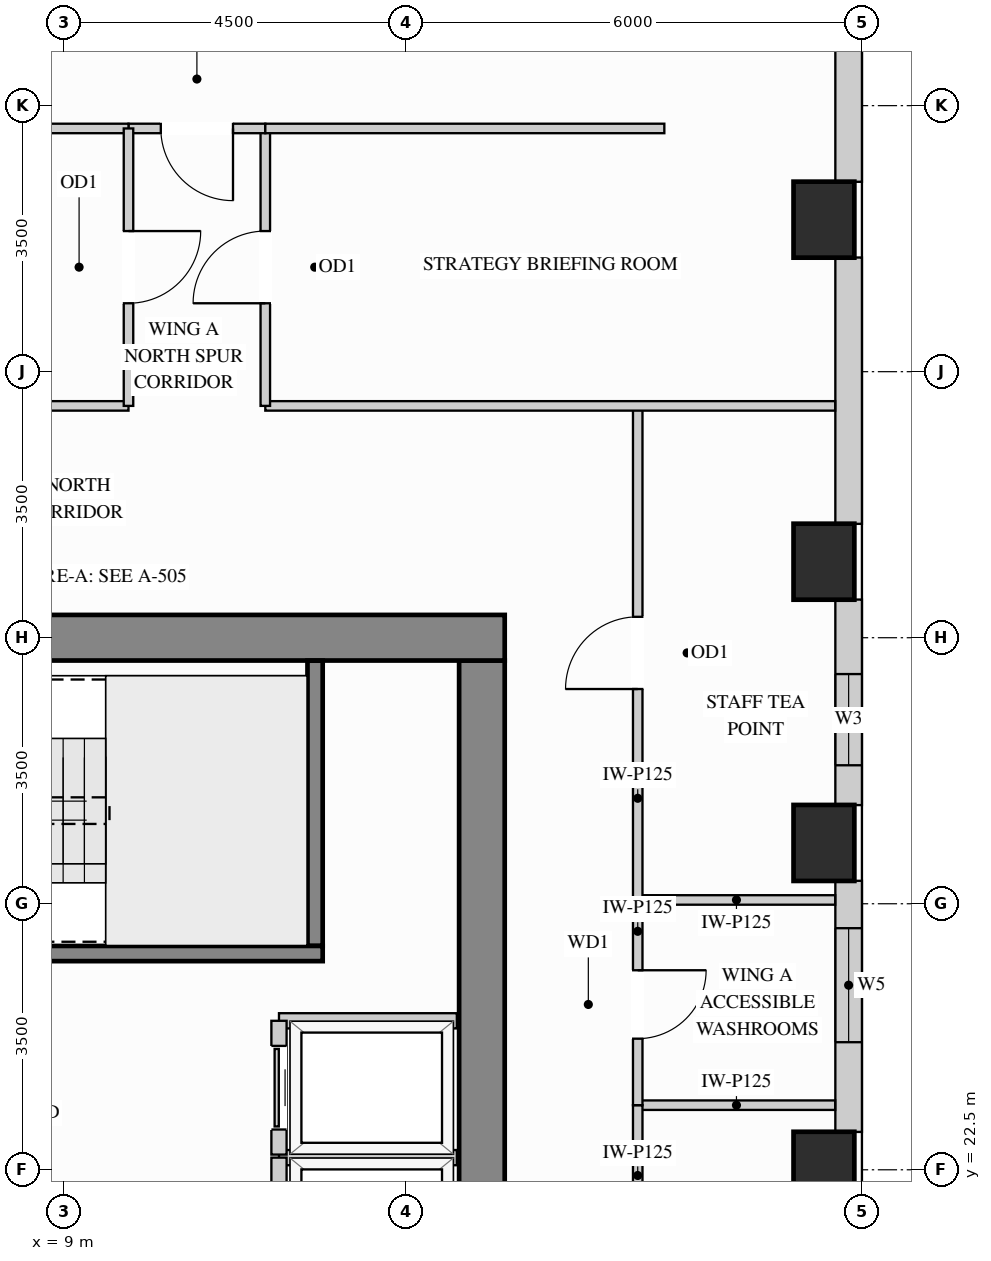
"""IFC4 building model, lengths in metres.
Left out: names, types, materials, properties, quantities, classifications, styles, units other than length and angle.
Written with IfcOpenShell. Run it as: python <this file> out.ifc"""

import sys

from ifc_helpers import new_model, si_unit, direction, frame, frame_2d, origin, origin_2d, place, context, subcontext, project, spatial, rectangle, extrude, source, transform, mapped, element, fill, save


model = new_model("IFC4")
c1 = context("Model", 3, precision=1e-05, world=origin(), true_north=direction((0.0, 1.0)))
c2 = subcontext(c1, "Body", "Model", "MODEL_VIEW")
j1 = project(units=[si_unit("LENGTHUNIT", "METRE"), si_unit("PLANEANGLEUNIT", "RADIAN")], contexts=[c1])
p1 = place(None, origin())
s1 = spatial("IfcSite", under=j1, at=p1, CompositionType="ELEMENT")
p2 = place(p1, origin())
s2 = spatial("IfcBuilding", under=s1, at=p2, CompositionType="ELEMENT")
p3 = place(p2, frame((0.0, 0.0, 179.1)))
s3 = spatial("IfcBuildingStorey", under=s2, at=p3, CompositionType="ELEMENT", Elevation=179.1)
m1 = source(origin(), c2, "Body", "SweptSolid", [
    extrude(rectangle(XDim=0.8, YDim=1.0, at=origin_2d()), origin(), (0.0, 0.0, 1.0), 3.4),
])
for number, where, z_axis, x_axis in (
    (1, (19.0, 22.5, 0.0), (0.0, 0.0, 1.0), (1.0, 0.0, 0.0)),
    (2, (19.0, 26.8, 0.0), (0.0, 0.0, 1.0), (1.0, 0.0, 0.0)),
    (3, (19.0, 30.5, 0.0), (0.0, 0.0, 1.0), (1.0, 0.0, 0.0)),
    (4, (19.0, 35.0, 0.0), (0.0, 0.0, 1.0), (1.0, 0.0, 0.0)),
):
    element("IfcColumn", number, at=place(p3, frame(where, z_axis=z_axis, x_axis=x_axis)), inside=s3, PredefinedType="COLUMN", context=c2, shape_type="MappedRepresentation", body=[
        mapped(m1, transform((0.0, 0.0, 0.0), x_axis=(1.0, 0.0, 0.0), y_axis=(0.0, 1.0, 0.0), z_axis=(0.0, 0.0, 1.0))),
    ])
m2 = source(origin(), c2, "Body", "SweptSolid", [
    extrude(rectangle(XDim=8.32, YDim=0.6, at=frame_2d((4.16, 0.0))), origin(), (0.0, 0.0, 1.0), 3.4),
])
p4 = place(p3, frame((14.5, 20.88, 0.0), z_axis=(0.0, 0.0, 1.0), x_axis=(0.0, 1.0, 0.0)))
e5 = element("IfcWall", 5, at=p4, inside=s3, PredefinedType="SHEAR", context=c2, shape_type="MappedRepresentation", body=[
    mapped(m2, transform((0.0, 0.0, 0.0), x_axis=(1.0, 0.0, 0.0), y_axis=(0.0, 1.0, 0.0), z_axis=(0.0, 0.0, 1.0))),
])
m3 = source(origin(), c2, "Body", "SweptSolid", [
    extrude(rectangle(XDim=10.6, YDim=0.6, at=frame_2d((5.3, 0.0))), origin(), (0.0, 0.0, 1.0), 3.4),
])
p5 = place(p3, frame((4.2, 29.5, 0.0), z_axis=(0.0, 0.0, 1.0), x_axis=(1.0, 0.0, 0.0)))
e6 = element("IfcWall", 6, at=p5, inside=s3, PredefinedType="SHEAR", context=c2, shape_type="MappedRepresentation", body=[
    mapped(m3, transform((0.0, 0.0, 0.0), x_axis=(1.0, 0.0, 0.0), y_axis=(0.0, 1.0, 0.0), z_axis=(0.0, 0.0, 1.0))),
])
p6 = place(p3, frame((19.325, 22.998, 0.0), z_axis=(0.0, 0.0, 1.0), x_axis=(0.0, 1.0, 0.0)))
e7 = element("IfcWall", 7, at=p6, inside=s3, PredefinedType="SOLIDWALL", context=c2, shape_type="SweptSolid", body=[
    extrude(rectangle(XDim=3.304, YDim=0.35, at=frame_2d((1.652, 0.0))), origin(), (0.0, 0.0, 1.0), 2.612),
])
p7 = place(p6, frame((1.18, 0.0, 0.78)))
e8 = element("IfcOpeningElement", 8, at=p7, cuts=e7, PredefinedType="OPENING", context=c2, shape_type="SweptSolid", body=[
    extrude(rectangle(XDim=1.5, YDim=1.652, at=frame_2d((0.75, 0.826))), frame((0.0, 0.185, 0.0), z_axis=(0.0, -1.0, 0.0), x_axis=(1.0, 0.0, 0.0)), (0.0, 0.0, 1.0), 0.37),
])
p8 = place(p3, frame((19.325, 27.298, 0.0), z_axis=(0.0, 0.0, 1.0), x_axis=(0.0, 1.0, 0.0)))
e9 = element("IfcWall", 9, at=p8, inside=s3, PredefinedType="SOLIDWALL", context=c2, shape_type="SweptSolid", body=[
    extrude(rectangle(XDim=2.704, YDim=0.35, at=frame_2d((1.352, 0.0))), origin(), (0.0, 0.0, 1.0), 2.612),
])
p9 = place(p8, frame((0.524, 0.0, 0.78)))
e10 = element("IfcOpeningElement", 10, at=p9, cuts=e9, PredefinedType="OPENING", context=c2, shape_type="SweptSolid", body=[
    extrude(rectangle(XDim=1.2, YDim=1.652, at=frame_2d((0.6, 0.826))), frame((0.0, 0.185, 0.0), z_axis=(0.0, -1.0, 0.0), x_axis=(1.0, 0.0, 0.0)), (0.0, 0.0, 1.0), 0.37),
])
m4 = source(origin(), c2, "Body", "SweptSolid", [
    extrude(rectangle(XDim=3.504, YDim=0.35, at=frame_2d((1.752, 0.0))), origin(), (0.0, 0.0, 1.0), 2.612),
])
p10 = place(p3, frame((19.325, 30.998, 0.0), z_axis=(0.0, 0.0, 1.0), x_axis=(0.0, 1.0, 0.0)))
e11 = element("IfcWall", 11, at=p10, inside=s3, PredefinedType="SOLIDWALL", context=c2, shape_type="MappedRepresentation", body=[
    mapped(m4, transform((0.0, 0.0, 0.0), x_axis=(1.0, 0.0, 0.0), y_axis=(0.0, 1.0, 0.0), z_axis=(0.0, 0.0, 1.0))),
])
m5 = source(origin(), c2, "Body", "SweptSolid", [
    extrude(rectangle(XDim=1.904, YDim=0.35, at=frame_2d((0.952, 0.0))), origin(), (0.0, 0.0, 1.0), 2.612),
])
p11 = place(p3, frame((19.325, 35.498, 0.0), z_axis=(0.0, 0.0, 1.0), x_axis=(0.0, 1.0, 0.0)))
e12 = element("IfcWall", 12, at=p11, inside=s3, PredefinedType="SOLIDWALL", context=c2, shape_type="MappedRepresentation", body=[
    mapped(m5, transform((0.0, 0.0, 0.0), x_axis=(1.0, 0.0, 0.0), y_axis=(0.0, 1.0, 0.0), z_axis=(0.0, 0.0, 1.0))),
])
m6 = source(origin(), c2, "Body", "SweptSolid", [
    extrude(rectangle(XDim=2.598, YDim=0.125, at=frame_2d((1.299, 0.0))), origin(), (0.0, 0.0, 1.0), 3.385),
])
for number, where, z_axis, x_axis in (
    (13, (16.55, 23.35, 0.0), (0.0, 0.0, 1.0), (1.0, 0.0, 0.0)),
    (14, (16.55, 26.05, 0.0), (0.0, 0.0, 1.0), (1.0, 0.0, 0.0)),
):
    element("IfcWall", number, at=place(p3, frame(where, z_axis=z_axis, x_axis=x_axis)), inside=s3, PredefinedType="PARTITIONING", context=c2, shape_type="MappedRepresentation", body=[
        mapped(m6, transform((0.0, 0.0, 0.0), x_axis=(1.0, 0.0, 0.0), y_axis=(0.0, 1.0, 0.0), z_axis=(0.0, 0.0, 1.0))),
    ])
p12 = place(p3, frame((16.55, 18.5, 0.0), z_axis=(0.0, 0.0, 1.0), x_axis=(0.0, 1.0, 0.0)))
e15 = element("IfcWall", 15, at=p12, inside=s3, PredefinedType="PARTITIONING", context=c2, shape_type="SweptSolid", body=[
    extrude(rectangle(XDim=4.85, YDim=0.125, at=frame_2d((2.425, 0.0))), origin(), (0.0, 0.0, 1.0), 3.385),
])
p13 = place(p12, frame((1.95, 0.0, 0.0)))
e16 = element("IfcOpeningElement", 16, at=p13, cuts=e15, PredefinedType="OPENING", context=c2, shape_type="SweptSolid", body=[
    extrude(rectangle(XDim=0.95, YDim=2.15, at=frame_2d((0.475, 1.075))), frame((0.0, 0.073, 0.0), z_axis=(0.0, -1.0, 0.0), x_axis=(1.0, 0.0, 0.0)), (0.0, 0.0, 1.0), 0.145),
])
p14 = place(p3, frame((16.55, 26.05, 0.0), z_axis=(0.0, 0.0, 1.0), x_axis=(0.0, 1.0, 0.0)))
e17 = element("IfcWall", 17, at=p14, inside=s3, PredefinedType="PARTITIONING", context=c2, shape_type="SweptSolid", body=[
    extrude(rectangle(XDim=6.5, YDim=0.125, at=frame_2d((3.25, 0.0))), origin(), (0.0, 0.0, 1.0), 3.385),
])
p15 = place(p14, frame((2.775, 0.0, 0.0)))
e18 = element("IfcOpeningElement", 18, at=p15, cuts=e17, PredefinedType="OPENING", context=c2, shape_type="SweptSolid", body=[
    extrude(rectangle(XDim=0.95, YDim=2.15, at=frame_2d((0.475, 1.075))), frame((0.0, 0.073, 0.0), z_axis=(0.0, -1.0, 0.0), x_axis=(1.0, 0.0, 0.0)), (0.0, 0.0, 1.0), 0.145),
])
p16 = place(p3, frame((16.55, 23.35, 0.0), z_axis=(0.0, 0.0, 1.0), x_axis=(0.0, 1.0, 0.0)))
e19 = element("IfcWall", 19, at=p16, inside=s3, PredefinedType="PARTITIONING", context=c2, shape_type="SweptSolid", body=[
    extrude(rectangle(XDim=2.7, YDim=0.125, at=frame_2d((1.35, 0.0))), origin(), (0.0, 0.0, 1.0), 3.385),
])
p17 = place(p16, frame((0.875, 0.0, 0.0)))
e20 = element("IfcOpeningElement", 20, at=p17, cuts=e19, PredefinedType="OPENING", context=c2, shape_type="SweptSolid", body=[
    extrude(rectangle(XDim=0.9, YDim=2.15, at=frame_2d((0.45, 1.075))), frame((0.0, 0.073, 0.0), z_axis=(0.0, -1.0, 0.0), x_axis=(1.0, 0.0, 0.0)), (0.0, 0.0, 1.0), 0.145),
])
m7 = source(origin(), c2, "Body", "SweptSolid", [
    extrude(rectangle(XDim=7.498, YDim=0.125, at=frame_2d((3.749, 0.0))), origin(), (0.0, 0.0, 1.0), 3.385),
])
p18 = place(p3, frame((11.65, 32.55, 0.0), z_axis=(0.0, 0.0, 1.0), x_axis=(1.0, 0.0, 0.0)))
e21 = element("IfcWall", 21, at=p18, inside=s3, PredefinedType="PARTITIONING", context=c2, shape_type="MappedRepresentation", body=[
    mapped(m7, transform((0.0, 0.0, 0.0), x_axis=(1.0, 0.0, 0.0), y_axis=(0.0, 1.0, 0.0), z_axis=(0.0, 0.0, 1.0))),
])
m8 = source(origin(), c2, "Body", "SweptSolid", [
    extrude(rectangle(XDim=9.498, YDim=0.125, at=frame_2d((4.749, 0.0))), origin(), (0.0, 0.0, 1.0), 3.385),
])
p19 = place(p3, frame((0.352, 32.55, 0.0), z_axis=(0.0, 0.0, 1.0), x_axis=(1.0, 0.0, 0.0)))
e22 = element("IfcWall", 22, at=p19, inside=s3, PredefinedType="PARTITIONING", context=c2, shape_type="MappedRepresentation", body=[
    mapped(m8, transform((0.0, 0.0, 0.0), x_axis=(1.0, 0.0, 0.0), y_axis=(0.0, 1.0, 0.0), z_axis=(0.0, 0.0, 1.0))),
])
p20 = place(p3, frame((11.65, 32.55, 0.0), z_axis=(0.0, 0.0, 1.0), x_axis=(0.0, 1.0, 0.0)))
e23 = element("IfcWall", 23, at=p20, inside=s3, PredefinedType="PARTITIONING", context=c2, shape_type="SweptSolid", body=[
    extrude(rectangle(XDim=3.65, YDim=0.125, at=frame_2d((1.825, 0.0))), origin(), (0.0, 0.0, 1.0), 3.385),
])
p21 = place(p20, frame((1.35, 0.0, 0.0)))
e24 = element("IfcOpeningElement", 24, at=p21, cuts=e23, PredefinedType="OPENING", context=c2, shape_type="SweptSolid", body=[
    extrude(rectangle(XDim=0.95, YDim=2.15, at=frame_2d((0.475, 1.075))), frame((0.0, 0.073, 0.0), z_axis=(0.0, -1.0, 0.0), x_axis=(1.0, 0.0, 0.0)), (0.0, 0.0, 1.0), 0.145),
])
p22 = place(p3, frame((9.85, 36.2, 0.0), z_axis=(0.0, 0.0, 1.0), x_axis=(1.0, 0.0, 0.0)))
e25 = element("IfcWall", 25, at=p22, inside=s3, PredefinedType="PARTITIONING", context=c2, shape_type="SweptSolid", body=[
    extrude(rectangle(XDim=1.8, YDim=0.125, at=frame_2d((0.9, 0.0))), origin(), (0.0, 0.0, 1.0), 2.848),
])
p23 = place(p22, frame((0.425, 0.0, 0.0)))
e26 = element("IfcOpeningElement", 26, at=p23, cuts=e25, PredefinedType="OPENING", context=c2, shape_type="SweptSolid", body=[
    extrude(rectangle(XDim=0.95, YDim=2.15, at=frame_2d((0.475, 1.075))), frame((0.0, 0.073, 0.0), z_axis=(0.0, -1.0, 0.0), x_axis=(1.0, 0.0, 0.0)), (0.0, 0.0, 1.0), 0.145),
])
m9 = source(origin(), c2, "Body", "SweptSolid", [
    extrude(rectangle(XDim=5.25, YDim=0.125, at=frame_2d((2.625, 0.0))), origin(), (0.0, 0.0, 1.0), 2.848),
])
p24 = place(p3, frame((11.65, 36.2, 0.0), z_axis=(0.0, 0.0, 1.0), x_axis=(1.0, 0.0, 0.0)))
e27 = element("IfcWall", 27, at=p24, inside=s3, PredefinedType="PARTITIONING", context=c2, shape_type="MappedRepresentation", body=[
    mapped(m9, transform((0.0, 0.0, 0.0), x_axis=(1.0, 0.0, 0.0), y_axis=(0.0, 1.0, 0.0), z_axis=(0.0, 0.0, 1.0))),
])
m10 = source(origin(), c2, "Body", "SweptSolid", [
    extrude(rectangle(XDim=7.25, YDim=0.125, at=frame_2d((3.625, 0.0))), origin(), (0.0, 0.0, 1.0), 2.848),
])
p25 = place(p3, frame((2.6, 36.2, 0.0), z_axis=(0.0, 0.0, 1.0), x_axis=(1.0, 0.0, 0.0)))
e28 = element("IfcWall", 28, at=p25, inside=s3, PredefinedType="PARTITIONING", context=c2, shape_type="MappedRepresentation", body=[
    mapped(m10, transform((0.0, 0.0, 0.0), x_axis=(1.0, 0.0, 0.0), y_axis=(0.0, 1.0, 0.0), z_axis=(0.0, 0.0, 1.0))),
])
p26 = place(p3, frame((9.85, 32.55, 0.0), z_axis=(0.0, 0.0, 1.0), x_axis=(0.0, 1.0, 0.0)))
e29 = element("IfcWall", 29, at=p26, inside=s3, PredefinedType="PARTITIONING", context=c2, shape_type="SweptSolid", body=[
    extrude(rectangle(XDim=3.65, YDim=0.125, at=frame_2d((1.825, 0.0))), origin(), (0.0, 0.0, 1.0), 3.385),
])
p27 = place(p26, frame((1.35, 0.0, 0.0)))
e30 = element("IfcOpeningElement", 30, at=p27, cuts=e29, PredefinedType="OPENING", context=c2, shape_type="SweptSolid", body=[
    extrude(rectangle(XDim=0.95, YDim=2.15, at=frame_2d((0.475, 1.075))), frame((0.0, 0.073, 0.0), z_axis=(0.0, -1.0, 0.0), x_axis=(1.0, 0.0, 0.0)), (0.0, 0.0, 1.0), 0.145),
])
m11 = source(origin(), c2, "Body", "SweptSolid", [
    extrude(rectangle(XDim=2.34, YDim=0.2, at=frame_2d((1.17, 0.0))), origin(), (0.0, 0.0, 1.0), 3.385),
])
p28 = place(p3, frame((11.83, 22.66, 0.0), z_axis=(0.0, 0.0, 1.0), x_axis=(1.0, 0.0, 0.0)))
e31 = element("IfcWall", 31, at=p28, inside=s3, PredefinedType="PARTITIONING", context=c2, shape_type="MappedRepresentation", body=[
    mapped(m11, transform((0.0, 0.0, 0.0), x_axis=(1.0, 0.0, 0.0), y_axis=(0.0, 1.0, 0.0), z_axis=(0.0, 0.0, 1.0))),
])
p29 = place(p3, frame((11.83, 20.9, 0.0), z_axis=(0.0, 0.0, 1.0), x_axis=(0.0, 1.0, 0.0)))
e32 = element("IfcWall", 32, at=p29, inside=s3, PredefinedType="PARTITIONING", context=c2, shape_type="SweptSolid", body=[
    extrude(rectangle(XDim=1.76, YDim=0.2, at=frame_2d((0.88, 0.0))), origin(), (0.0, 0.0, 1.0), 3.385),
])
p30 = place(p29, frame((0.33, 0.0, 0.0)))
e33 = element("IfcOpeningElement", 33, at=p30, cuts=e32, PredefinedType="OPENING", context=c2, shape_type="SweptSolid", body=[
    extrude(rectangle(XDim=1.1, YDim=2.2, at=frame_2d((0.55, 1.1))), frame((0.0, 0.11, 0.0), z_axis=(0.0, -1.0, 0.0), x_axis=(1.0, 0.0, 0.0)), (0.0, 0.0, 1.0), 0.22),
])
p31 = place(p3, frame((11.83, 24.46, 0.0), z_axis=(0.0, 0.0, 1.0), x_axis=(1.0, 0.0, 0.0)))
e34 = element("IfcWall", 34, at=p31, inside=s3, PredefinedType="PARTITIONING", context=c2, shape_type="MappedRepresentation", body=[
    mapped(m11, transform((0.0, 0.0, 0.0), x_axis=(1.0, 0.0, 0.0), y_axis=(0.0, 1.0, 0.0), z_axis=(0.0, 0.0, 1.0))),
])
p32 = place(p3, frame((11.83, 22.7, 0.0), z_axis=(0.0, 0.0, 1.0), x_axis=(0.0, 1.0, 0.0)))
e35 = element("IfcWall", 35, at=p32, inside=s3, PredefinedType="PARTITIONING", context=c2, shape_type="SweptSolid", body=[
    extrude(rectangle(XDim=1.76, YDim=0.2, at=frame_2d((0.88, 0.0))), origin(), (0.0, 0.0, 1.0), 3.385),
])
p33 = place(p32, frame((0.33, 0.0, 0.0)))
e36 = element("IfcOpeningElement", 36, at=p33, cuts=e35, PredefinedType="OPENING", context=c2, shape_type="SweptSolid", body=[
    extrude(rectangle(XDim=1.1, YDim=2.2, at=frame_2d((0.55, 1.1))), frame((0.0, 0.11, 0.0), z_axis=(0.0, -1.0, 0.0), x_axis=(1.0, 0.0, 0.0)), (0.0, 0.0, 1.0), 0.22),
])
m12 = source(origin(), c2, "Body", "SweptSolid", [
    extrude(rectangle(XDim=3.753, YDim=0.2, at=frame_2d((1.876, 0.0))), origin(), (0.0, 0.0, 1.0), 3.4),
])
p34 = place(p3, frame((12.305, 25.445, 0.0), z_axis=(0.0, 0.0, 1.0), x_axis=(0.0, 1.0, 0.0)))
e37 = element("IfcWall", 37, at=p34, inside=s3, PredefinedType="SHEAR", context=c2, shape_type="MappedRepresentation", body=[
    mapped(m12, transform((0.0, 0.0, 0.0), x_axis=(1.0, 0.0, 0.0), y_axis=(0.0, 1.0, 0.0), z_axis=(0.0, 0.0, 1.0))),
])
p35 = place(p3, frame((4.802, 25.345, 0.0), z_axis=(0.0, 0.0, 1.0), x_axis=(1.0, 0.0, 0.0)))
e38 = element("IfcWall", 38, at=p35, inside=s3, PredefinedType="SHEAR", context=c2, shape_type="SweptSolid", body=[
    extrude(rectangle(XDim=7.603, YDim=0.2, at=frame_2d((3.802, 0.0))), origin(), (0.0, 0.0, 1.0), 3.4),
])
p36 = place(p35, frame((0.4, 0.0, 0.0)))
e39 = element("IfcOpeningElement", 39, at=p36, cuts=e38, PredefinedType="OPENING", context=c2, shape_type="SweptSolid", body=[
    extrude(rectangle(XDim=1.1, YDim=2.15, at=frame_2d((0.55, 1.075))), frame((0.0, 0.11, 0.0), z_axis=(0.0, -1.0, 0.0), x_axis=(1.0, 0.0, 0.0)), (0.0, 0.0, 1.0), 0.22),
])
m13 = source(origin(), c2, "Body", "SweptSolid", [
    extrude(rectangle(XDim=1.1, YDim=2.2, at=frame_2d((0.55, 1.1))), frame((0.0, 0.025, 0.0), z_axis=(0.0, -1.0, 0.0), x_axis=(1.0, 0.0, 0.0)), (0.0, 0.0, 1.0), 0.05),
])
p37 = place(p33, origin())
e40 = element("IfcDoor", 40, at=p37, inside=s3, OperationType="SLIDING_TO_LEFT", PredefinedType="DOOR", context=c2, shape_type="MappedRepresentation", body=[
    mapped(m13, transform((0.0, 0.0, 0.0), x_axis=(1.0, 0.0, 0.0), y_axis=(0.0, 1.0, 0.0), z_axis=(0.0, 0.0, 1.0))),
])
fill(e36, e40)
m14 = source(origin(), c2, "Body", "SweptSolid", [
    extrude(rectangle(XDim=0.95, YDim=2.15, at=frame_2d((0.475, 1.075))), frame((0.0, 0.025, 0.0), z_axis=(0.0, -1.0, 0.0), x_axis=(1.0, 0.0, 0.0)), (0.0, 0.0, 1.0), 0.05),
])
p38 = place(p15, origin())
e41 = element("IfcDoor", 41, at=p38, inside=s3, OperationType="SINGLE_SWING_LEFT", PredefinedType="DOOR", context=c2, shape_type="MappedRepresentation", body=[
    mapped(m14, transform((0.0, 0.0, 0.0), x_axis=(1.0, 0.0, 0.0), y_axis=(0.0, 1.0, 0.0), z_axis=(0.0, 0.0, 1.0))),
])
fill(e18, e41)
p39 = place(p21, origin())
e42 = element("IfcDoor", 42, at=p39, inside=s3, OperationType="SINGLE_SWING_LEFT", PredefinedType="DOOR", context=c2, shape_type="MappedRepresentation", body=[
    mapped(m14, transform((0.0, 0.0, 0.0), x_axis=(1.0, 0.0, 0.0), y_axis=(0.0, 1.0, 0.0), z_axis=(0.0, 0.0, 1.0))),
])
fill(e24, e42)
p40 = place(p23, origin())
e43 = element("IfcDoor", 43, at=p40, inside=s3, OperationType="SINGLE_SWING_RIGHT", PredefinedType="DOOR", context=c2, shape_type="MappedRepresentation", body=[
    mapped(m14, transform((0.0, 0.0, 0.0), x_axis=(1.0, 0.0, 0.0), y_axis=(0.0, 1.0, 0.0), z_axis=(0.0, 0.0, 1.0))),
])
fill(e26, e43)
p41 = place(p27, origin())
e44 = element("IfcDoor", 44, at=p41, inside=s3, OperationType="SINGLE_SWING_RIGHT", PredefinedType="DOOR", context=c2, shape_type="MappedRepresentation", body=[
    mapped(m14, transform((0.0, 0.0, 0.0), x_axis=(1.0, 0.0, 0.0), y_axis=(0.0, 1.0, 0.0), z_axis=(0.0, 0.0, 1.0))),
])
fill(e30, e44)
m15 = source(origin(), c2, "Body", "SweptSolid", [
    extrude(rectangle(XDim=0.9, YDim=2.15, at=frame_2d((0.45, 1.075))), frame((0.0, 0.025, 0.0), z_axis=(0.0, -1.0, 0.0), x_axis=(1.0, 0.0, 0.0)), (0.0, 0.0, 1.0), 0.05),
])
p42 = place(p17, origin())
e45 = element("IfcDoor", 45, at=p42, inside=s3, OperationType="SINGLE_SWING_RIGHT", PredefinedType="DOOR", context=c2, shape_type="MappedRepresentation", body=[
    mapped(m15, transform((0.0, 0.0, 0.0), x_axis=(1.0, 0.0, 0.0), y_axis=(0.0, 1.0, 0.0), z_axis=(0.0, 0.0, 1.0))),
])
fill(e20, e45)
m16 = source(origin(), c2, "Body", "SweptSolid", [
    extrude(rectangle(XDim=1.2, YDim=1.652, at=frame_2d((0.6, 0.826))), frame((0.0, 0.03, 0.0), z_axis=(0.0, -1.0, 0.0), x_axis=(1.0, 0.0, 0.0)), (0.0, 0.0, 1.0), 0.06),
])
p43 = place(p9, origin())
e46 = element("IfcWindow", 46, at=p43, inside=s3, PartitioningType="SINGLE_PANEL", PredefinedType="WINDOW", context=c2, shape_type="MappedRepresentation", body=[
    mapped(m16, transform((0.0, 0.0, 0.0), x_axis=(1.0, 0.0, 0.0), y_axis=(0.0, 1.0, 0.0), z_axis=(0.0, 0.0, 1.0))),
])
fill(e10, e46)
m17 = source(origin(), c2, "Body", "SweptSolid", [
    extrude(rectangle(XDim=1.5, YDim=1.652, at=frame_2d((0.75, 0.826))), frame((0.0, 0.03, 0.0), z_axis=(0.0, -1.0, 0.0), x_axis=(1.0, 0.0, 0.0)), (0.0, 0.0, 1.0), 0.06),
])
p44 = place(p7, origin())
e47 = element("IfcWindow", 47, at=p44, inside=s3, PartitioningType="SINGLE_PANEL", PredefinedType="WINDOW", context=c2, shape_type="MappedRepresentation", body=[
    mapped(m17, transform((0.0, 0.0, 0.0), x_axis=(1.0, 0.0, 0.0), y_axis=(0.0, 1.0, 0.0), z_axis=(0.0, 0.0, 1.0))),
])
fill(e8, e47)
save(model, sys.argv[1])
